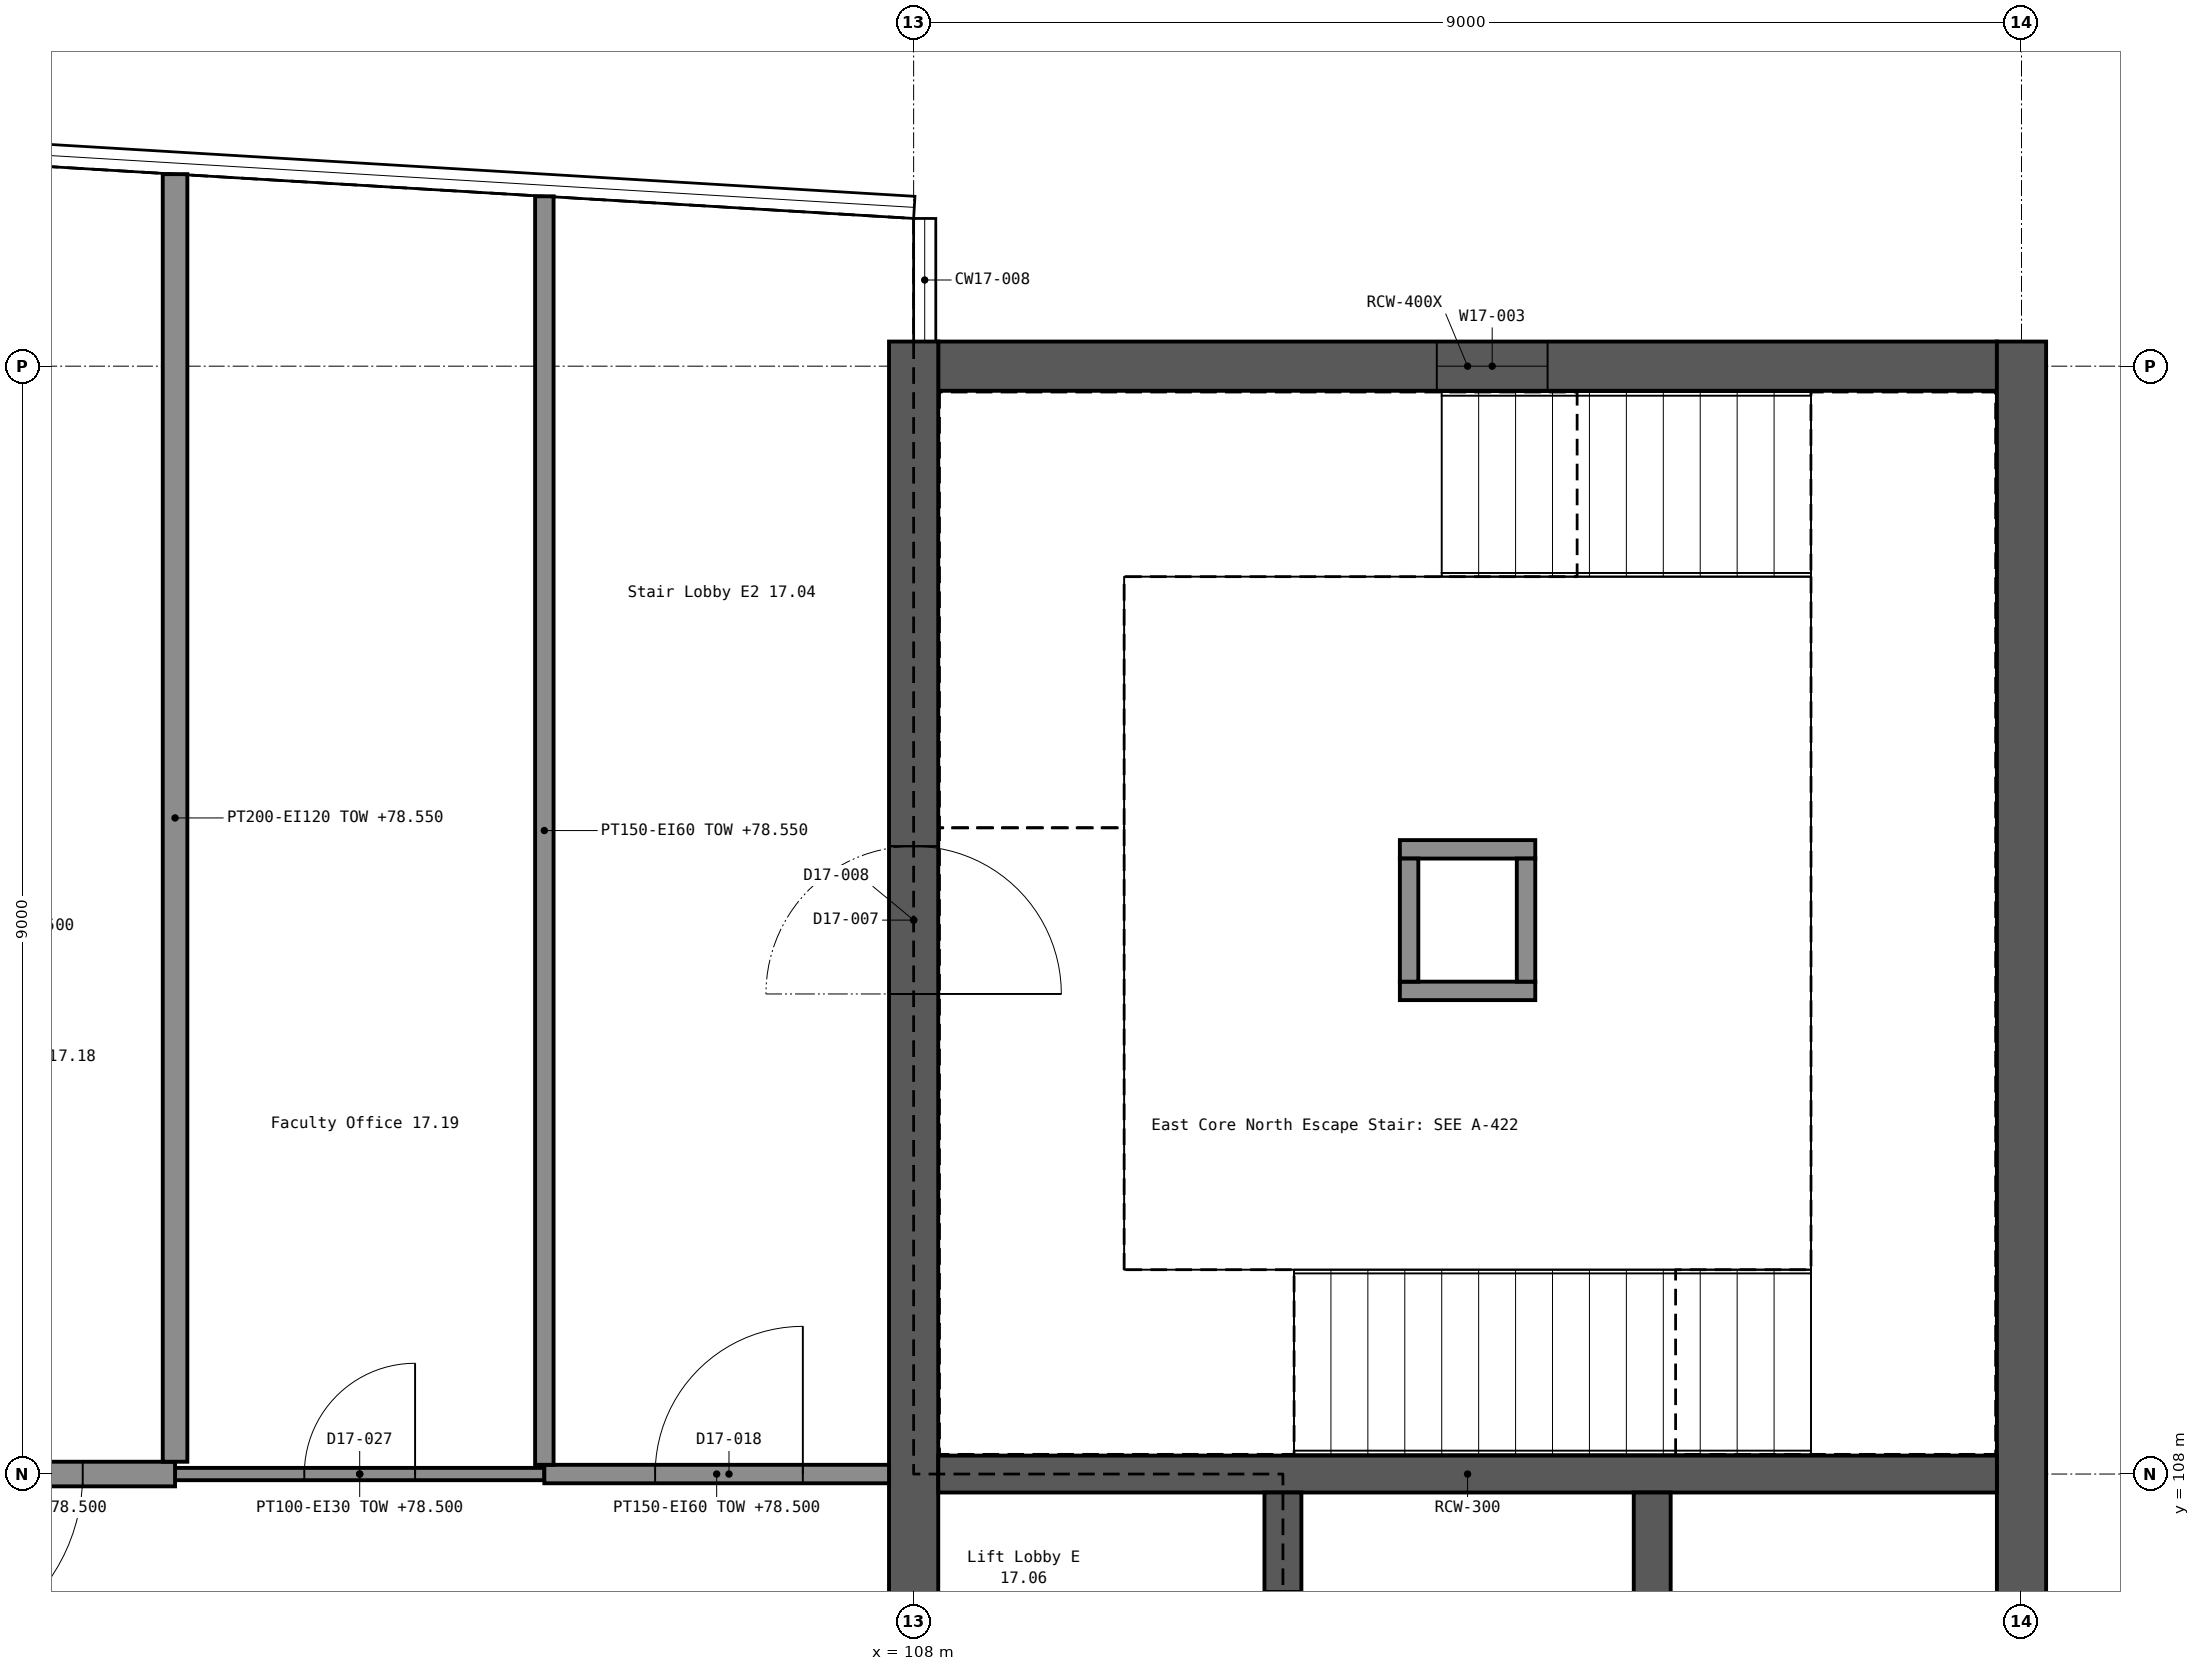
"""IFC4 building model, lengths in metres.
Left out: names, types, materials, properties, quantities, classifications, styles, units other than length and angle.
Written with IfcOpenShell. Run it as: python <this file> out.ifc"""

import sys

from ifc_helpers import new_model, si_unit, direction, frame, frame_2d, origin, origin_2d, place, context, subcontext, project, spatial, rectangle, extrude, element, fill, save


model = new_model("IFC4")
c1 = context("Model", 3, precision=1e-05, world=origin(), true_north=direction((0.0, 1.0)))
c2 = subcontext(c1, "Body", "Model", "MODEL_VIEW")
j1 = project(units=[si_unit("LENGTHUNIT", "METRE"), si_unit("PLANEANGLEUNIT", "RADIAN")], contexts=[c1])
p1 = place(None, origin())
s1 = spatial("IfcSite", under=j1, at=p1, CompositionType="ELEMENT")
p2 = place(p1, origin())
s2 = spatial("IfcBuilding", under=s1, at=p2, CompositionType="ELEMENT")
p3 = place(p2, frame((0.0, 0.0, 75.3)))
s3 = spatial("IfcBuildingStorey", under=s2, at=p3, CompositionType="ELEMENT", Elevation=75.3)
p4 = place(p3, frame((108.2, 117.0, 0.0), z_axis=(0.0, 0.0, 1.0), x_axis=(1.0, 0.0, 0.0)))
e1 = element("IfcWall", 1, at=p4, inside=s3, PredefinedType="SHEAR", context=c2, shape_type="SweptSolid", body=[
    extrude(rectangle(XDim=8.6, YDim=0.4, at=frame_2d((4.3, 0.0))), origin(), (0.0, 0.0, 1.0), 7.5),
])
p5 = place(p4, frame((4.05, 0.0, 1.2)))
e2 = element("IfcOpeningElement", 2, at=p5, cuts=e1, PredefinedType="OPENING", context=c2, shape_type="SweptSolid", body=[
    extrude(rectangle(XDim=0.9, YDim=1.5, at=frame_2d((0.45, 0.75))), frame((0.0, 0.211, 0.0), z_axis=(0.0, -1.0, 0.0), x_axis=(1.0, 0.0, 0.0)), (0.0, 0.0, 1.0), 0.422),
])
p6 = place(p3, frame((108.0, 89.8, 0.0), z_axis=(0.0, 0.0, 1.0), x_axis=(0.0, 1.0, 0.0)))
e3 = element("IfcWall", 3, at=p6, inside=s3, PredefinedType="SHEAR", context=c2, shape_type="SweptSolid", body=[
    extrude(rectangle(XDim=27.4, YDim=0.4, at=frame_2d((13.7, 0.0))), origin(), (0.0, 0.0, 1.0), 7.5),
])
p7 = place(p6, frame((4.1, 0.0, 0.0)))
e4 = element("IfcOpeningElement", 4, at=p7, cuts=e3, PredefinedType="OPENING", context=c2, shape_type="SweptSolid", body=[
    extrude(rectangle(XDim=1.2, YDim=2.1, at=frame_2d((0.6, 1.05))), frame((0.0, 0.211, 0.0), z_axis=(0.0, -1.0, 0.0), x_axis=(1.0, 0.0, 0.0)), (0.0, 0.0, 1.0), 0.422),
])
p8 = place(p6, frame((4.1, 0.0, 3.9)))
e5 = element("IfcOpeningElement", 5, at=p8, cuts=e3, PredefinedType="OPENING", context=c2, shape_type="SweptSolid", body=[
    extrude(rectangle(XDim=1.2, YDim=2.1, at=frame_2d((0.6, 1.05))), frame((0.0, 0.211, 0.0), z_axis=(0.0, -1.0, 0.0), x_axis=(1.0, 0.0, 0.0)), (0.0, 0.0, 1.0), 0.422),
])
p9 = place(p6, frame((22.1, 0.0, 0.0)))
e6 = element("IfcOpeningElement", 6, at=p9, cuts=e3, PredefinedType="OPENING", context=c2, shape_type="SweptSolid", body=[
    extrude(rectangle(XDim=1.2, YDim=2.1, at=frame_2d((0.6, 1.05))), frame((0.0, 0.211, 0.0), z_axis=(0.0, -1.0, 0.0), x_axis=(1.0, 0.0, 0.0)), (0.0, 0.0, 1.0), 0.422),
])
p10 = place(p6, frame((22.1, 0.0, 3.9)))
e7 = element("IfcOpeningElement", 7, at=p10, cuts=e3, PredefinedType="OPENING", context=c2, shape_type="SweptSolid", body=[
    extrude(rectangle(XDim=1.2, YDim=2.1, at=frame_2d((0.6, 1.05))), frame((0.0, 0.211, 0.0), z_axis=(0.0, -1.0, 0.0), x_axis=(1.0, 0.0, 0.0)), (0.0, 0.0, 1.0), 0.422),
])
p11 = place(p6, frame((12.5, 0.0, 0.0)))
e8 = element("IfcOpeningElement", 8, at=p11, cuts=e3, PredefinedType="OPENING", context=c2, shape_type="SweptSolid", body=[
    extrude(rectangle(XDim=2.0, YDim=2.1, at=frame_2d((1.0, 1.05))), frame((0.0, 0.211, 0.0), z_axis=(0.0, -1.0, 0.0), x_axis=(1.0, 0.0, 0.0)), (0.0, 0.0, 1.0), 0.422),
])
p12 = place(p3, frame((117.0, 89.8, 0.0), z_axis=(0.0, 0.0, 1.0), x_axis=(0.0, 1.0, 0.0)))
e9 = element("IfcWall", 9, at=p12, inside=s3, PredefinedType="SHEAR", context=c2, shape_type="SweptSolid", body=[
    extrude(rectangle(XDim=27.4, YDim=0.4, at=frame_2d((13.7, 0.0))), origin(), (0.0, 0.0, 1.0), 7.5),
])
p13 = place(p3, frame((108.2, 108.0, 0.0), z_axis=(0.0, 0.0, 1.0), x_axis=(1.0, 0.0, 0.0)))
e10 = element("IfcWall", 10, at=p13, inside=s3, PredefinedType="SHEAR", context=c2, shape_type="SweptSolid", body=[
    extrude(rectangle(XDim=8.6, YDim=0.3, at=frame_2d((4.3, 0.0))), origin(), (0.0, 0.0, 1.0), 7.5),
])
p14 = place(p3, frame((111.0, 99.15, 0.0), z_axis=(0.0, 0.0, 1.0), x_axis=(0.0, 1.0, 0.0)))
e11 = element("IfcWall", 11, at=p14, inside=s3, PredefinedType="SHEAR", context=c2, shape_type="SweptSolid", body=[
    extrude(rectangle(XDim=8.7, YDim=0.3, at=frame_2d((4.35, 0.0))), origin(), (0.0, 0.0, 1.0), 7.5),
])
p15 = place(p14, frame((0.8, 0.0, 0.0)))
e12 = element("IfcOpeningElement", 12, at=p15, cuts=e11, PredefinedType="OPENING", context=c2, shape_type="SweptSolid", body=[
    extrude(rectangle(XDim=1.1, YDim=2.1, at=frame_2d((0.55, 1.05))), frame((0.0, 0.161, 0.0), z_axis=(0.0, -1.0, 0.0), x_axis=(1.0, 0.0, 0.0)), (0.0, 0.0, 1.0), 0.322),
])
p16 = place(p14, frame((3.8, 0.0, 0.0)))
e13 = element("IfcOpeningElement", 13, at=p16, cuts=e11, PredefinedType="OPENING", context=c2, shape_type="SweptSolid", body=[
    extrude(rectangle(XDim=1.1, YDim=2.1, at=frame_2d((0.55, 1.05))), frame((0.0, 0.161, 0.0), z_axis=(0.0, -1.0, 0.0), x_axis=(1.0, 0.0, 0.0)), (0.0, 0.0, 1.0), 0.322),
])
p17 = place(p14, frame((6.8, 0.0, 0.0)))
e14 = element("IfcOpeningElement", 14, at=p17, cuts=e11, PredefinedType="OPENING", context=c2, shape_type="SweptSolid", body=[
    extrude(rectangle(XDim=1.1, YDim=2.1, at=frame_2d((0.55, 1.05))), frame((0.0, 0.161, 0.0), z_axis=(0.0, -1.0, 0.0), x_axis=(1.0, 0.0, 0.0)), (0.0, 0.0, 1.0), 0.322),
])
p18 = place(p3, frame((114.0, 99.15, 0.0), z_axis=(0.0, 0.0, 1.0), x_axis=(0.0, 1.0, 0.0)))
e15 = element("IfcWall", 15, at=p18, inside=s3, PredefinedType="SHEAR", context=c2, shape_type="SweptSolid", body=[
    extrude(rectangle(XDim=8.7, YDim=0.3, at=frame_2d((4.35, 0.0))), origin(), (0.0, 0.0, 1.0), 7.5),
])
p19 = place(p3, frame((107.875, 117.2, 3.9), z_axis=(0.0, 0.0, 1.0), x_axis=(0.0, 1.0, 0.0)))
e16 = element("IfcWall", 16, at=p19, inside=s3, PredefinedType="PARAPET", context=c2, shape_type="SweptSolid", body=[
    extrude(rectangle(XDim=1.015, YDim=0.25, at=frame_2d((0.507, 0.0))), origin(), (0.0, 0.0, 1.0), 1.1),
])
p20 = place(p3, frame((107.75, 118.09, 3.9), z_axis=(0.0, 0.0, 1.0), x_axis=(-0.998206819367, 0.059859383295, 0.0)))
e17 = element("IfcWall", 17, at=p20, inside=s3, PredefinedType="PARAPET", context=c2, shape_type="SweptSolid", body=[
    extrude(rectangle(XDim=2.957, YDim=0.25, at=frame_2d((1.479, 0.0))), origin(), (0.0, 0.0, 1.0), 2.1),
])
p21 = place(p3, frame((104.799, 118.267, 3.9), z_axis=(0.0, 0.0, 1.0), x_axis=(-0.99820652349, 0.059864317109, 0.0)))
e18 = element("IfcWall", 18, at=p21, inside=s3, PredefinedType="PARAPET", context=c2, shape_type="SweptSolid", body=[
    extrude(rectangle(XDim=2.957, YDim=0.25, at=frame_2d((1.479, 0.0))), origin(), (0.0, 0.0, 1.0), 1.6),
])
p22 = place(p3, frame((101.847, 118.444, 3.9), z_axis=(0.0, 0.0, 1.0), x_axis=(-0.998201882594, 0.059941651511, 0.0)))
e19 = element("IfcWall", 19, at=p22, inside=s3, PredefinedType="PARAPET", context=c2, shape_type="SweptSolid", body=[
    extrude(rectangle(XDim=2.957, YDim=0.25, at=frame_2d((1.479, 0.0))), origin(), (0.0, 0.0, 1.0), 1.3),
])
p23 = place(p3, frame((108.0, 100.1, 7.5), z_axis=(0.0, 0.0, 1.0), x_axis=(0.0, 1.0, 0.0)))
e20 = element("IfcWall", 20, at=p23, inside=s3, PredefinedType="PARAPET", context=c2, shape_type="SweptSolid", body=[
    extrude(rectangle(XDim=17.05, YDim=0.3, at=frame_2d((8.525, 0.0))), origin(), (0.0, 0.0, 1.0), 1.1),
])
p24 = place(p3, frame((117.0, 89.85, 7.5), z_axis=(0.0, 0.0, 1.0), x_axis=(0.0, 1.0, 0.0)))
e21 = element("IfcWall", 21, at=p24, inside=s3, PredefinedType="PARAPET", context=c2, shape_type="SweptSolid", body=[
    extrude(rectangle(XDim=27.3, YDim=0.3, at=frame_2d((13.65, 0.0))), origin(), (0.0, 0.0, 1.0), 1.1),
])
p25 = place(p3, frame((108.15, 117.0, 7.5), z_axis=(0.0, 0.0, 1.0), x_axis=(1.0, 0.0, 0.0)))
e22 = element("IfcWall", 22, at=p25, inside=s3, PredefinedType="PARAPET", context=c2, shape_type="SweptSolid", body=[
    extrude(rectangle(XDim=8.7, YDim=0.3, at=frame_2d((4.35, 0.0))), origin(), (0.0, 0.0, 1.0), 1.1),
])
for number, where, z_axis, x_axis in (
    (23, (111.95, 111.925, 7.5), (0.0, 0.0, 1.0), (1.0, 0.0, 0.0)),
    (24, (111.95, 113.075, 7.5), (0.0, 0.0, 1.0), (1.0, 0.0, 0.0)),
):
    element("IfcWall", number, at=place(p3, frame(where, z_axis=z_axis, x_axis=x_axis)), inside=s3, PredefinedType="SOLIDWALL", context=c2, shape_type="SweptSolid", body=[
        extrude(rectangle(XDim=1.1, YDim=0.15, at=frame_2d((0.55, 0.0))), origin(), (0.0, 0.0, 1.0), 0.15),
    ])
for number, where, z_axis, x_axis in (
    (25, (112.025, 112.0, 7.5), (0.0, 0.0, 1.0), (0.0, 1.0, 0.0)),
    (26, (112.975, 112.0, 7.5), (0.0, 0.0, 1.0), (0.0, 1.0, 0.0)),
):
    element("IfcWall", number, at=place(p3, frame(where, z_axis=z_axis, x_axis=x_axis)), inside=s3, PredefinedType="SOLIDWALL", context=c2, shape_type="SweptSolid", body=[
        extrude(rectangle(XDim=1.0, YDim=0.15, at=frame_2d((0.5, 0.0))), origin(), (0.0, 0.0, 1.0), 0.15),
    ])
p26 = place(p3, frame((102.0, 108.0, 0.0), z_axis=(0.0, 0.0, 1.0), x_axis=(1.0, 0.0, 0.0)))
e27 = element("IfcWall", 27, at=p26, inside=s3, PredefinedType="PARTITIONING", context=c2, shape_type="SweptSolid", body=[
    extrude(rectangle(XDim=3.0, YDim=0.1, at=frame_2d((1.5, 0.0))), origin(), (0.0, 0.0, 1.0), 3.2),
])
p27 = place(p26, frame((1.05, 0.0, 0.0)))
e28 = element("IfcOpeningElement", 28, at=p27, cuts=e27, PredefinedType="OPENING", context=c2, shape_type="SweptSolid", body=[
    extrude(rectangle(XDim=0.9, YDim=2.1, at=frame_2d((0.45, 1.05))), frame((0.0, 0.061, 0.0), z_axis=(0.0, -1.0, 0.0), x_axis=(1.0, 0.0, 0.0)), (0.0, 0.0, 1.0), 0.122),
])
p28 = place(p3, frame((105.0, 108.0, 0.0), z_axis=(0.0, 0.0, 1.0), x_axis=(1.0, 0.0, 0.0)))
e29 = element("IfcWall", 29, at=p28, inside=s3, PredefinedType="PARTITIONING", context=c2, shape_type="SweptSolid", body=[
    extrude(rectangle(XDim=2.8, YDim=0.15, at=frame_2d((1.4, 0.0))), origin(), (0.0, 0.0, 1.0), 3.2),
])
p29 = place(p28, frame((0.9, 0.0, 0.0)))
e30 = element("IfcOpeningElement", 30, at=p29, cuts=e29, PredefinedType="OPENING", context=c2, shape_type="SweptSolid", body=[
    extrude(rectangle(XDim=1.2, YDim=2.1, at=frame_2d((0.6, 1.05))), frame((0.0, 0.086, 0.0), z_axis=(0.0, -1.0, 0.0), x_axis=(1.0, 0.0, 0.0)), (0.0, 0.0, 1.0), 0.172),
])
p30 = place(p3, frame((99.13, 108.0, 0.0), z_axis=(0.0, 0.0, 1.0), x_axis=(1.0, 0.0, 0.0)))
e31 = element("IfcWall", 31, at=p30, inside=s3, PredefinedType="PARTITIONING", context=c2, shape_type="SweptSolid", body=[
    extrude(rectangle(XDim=2.87, YDim=0.2, at=frame_2d((1.435, 0.0))), origin(), (0.0, 0.0, 1.0), 3.2),
])
p31 = place(p30, frame((0.62, 0.0, 0.0)))
e32 = element("IfcOpeningElement", 32, at=p31, cuts=e31, PredefinedType="OPENING", context=c2, shape_type="SweptSolid", body=[
    extrude(rectangle(XDim=1.5, YDim=2.4, at=frame_2d((0.75, 1.2))), frame((0.0, 0.111, 0.0), z_axis=(0.0, -1.0, 0.0), x_axis=(1.0, 0.0, 0.0)), (0.0, 0.0, 1.0), 0.222),
])
p32 = place(p3, frame((102.0, 108.1, 0.0), z_axis=(0.0, 0.0, 1.0), x_axis=(0.0, 1.0, 0.0)))
e33 = element("IfcWall", 33, at=p32, inside=s3, PredefinedType="PARTITIONING", context=c2, shape_type="SweptSolid", body=[
    extrude(rectangle(XDim=10.46, YDim=0.2, at=frame_2d((5.23, 0.0))), origin(), (0.0, 0.0, 1.0), 3.25),
])
p33 = place(p3, frame((105.0, 108.075, 0.0), z_axis=(0.0, 0.0, 1.0), x_axis=(0.0, 1.0, 0.0)))
e34 = element("IfcWall", 34, at=p33, inside=s3, PredefinedType="PARTITIONING", context=c2, shape_type="SweptSolid", body=[
    extrude(rectangle(XDim=10.305, YDim=0.15, at=frame_2d((5.152, 0.0))), origin(), (0.0, 0.0, 1.0), 3.25),
])
p34 = place(p5, origin())
e35 = element("IfcWindow", 35, at=p34, inside=s3, PartitioningType="SINGLE_PANEL", PredefinedType="WINDOW", context=c2, shape_type="SweptSolid", body=[
    extrude(rectangle(XDim=0.9, YDim=1.5, at=frame_2d((0.45, 0.75))), frame((0.0, 0.03, 0.0), z_axis=(0.0, -1.0, 0.0), x_axis=(1.0, 0.0, 0.0)), (0.0, 0.0, 1.0), 0.06),
])
fill(e2, e35)
p35 = place(p2, frame((0.0, 0.0, 82.5)))
p36 = place(p35, origin())
p37 = place(p36, frame((112.5, 112.5, 0.0)))
p38 = place(p37, frame((0.0, 0.0, 0.25)))
e36 = element("IfcWindow", 36, at=p38, inside=s3, PartitioningType="SINGLE_PANEL", PredefinedType="SKYLIGHT", context=c2, shape_type="SweptSolid", body=[
    extrude(rectangle(XDim=0.8, YDim=1.0, at=origin_2d()), origin(), (0.0, 0.0, 1.0), 0.05),
])
p39 = place(p9, frame((1.2, 0.0, 0.0), z_axis=(0.0, 0.0, 1.0), x_axis=(-1.0, 0.0, 0.0)))
e37 = element("IfcDoor", 37, at=p39, inside=s3, OperationType="SINGLE_SWING_RIGHT", PredefinedType="DOOR", context=c2, shape_type="SweptSolid", body=[
    extrude(rectangle(XDim=1.2, YDim=2.1, at=frame_2d((0.6, 1.05))), frame((0.0, 0.025, 0.0), z_axis=(0.0, -1.0, 0.0), x_axis=(1.0, 0.0, 0.0)), (0.0, 0.0, 1.0), 0.05),
])
fill(e6, e37)
p40 = place(p10, origin())
e38 = element("IfcDoor", 38, at=p40, inside=s3, OperationType="SINGLE_SWING_LEFT", PredefinedType="DOOR", context=c2, shape_type="SweptSolid", body=[
    extrude(rectangle(XDim=1.2, YDim=2.1, at=frame_2d((0.6, 1.05))), frame((0.0, 0.025, 0.0), z_axis=(0.0, -1.0, 0.0), x_axis=(1.0, 0.0, 0.0)), (0.0, 0.0, 1.0), 0.05),
])
fill(e7, e38)
p41 = place(p29, origin())
e39 = element("IfcDoor", 39, at=p41, inside=s3, OperationType="SINGLE_SWING_RIGHT", PredefinedType="DOOR", context=c2, shape_type="SweptSolid", body=[
    extrude(rectangle(XDim=1.2, YDim=2.1, at=frame_2d((0.6, 1.05))), frame((0.0, 0.025, 0.0), z_axis=(0.0, -1.0, 0.0), x_axis=(1.0, 0.0, 0.0)), (0.0, 0.0, 1.0), 0.05),
])
fill(e30, e39)
p42 = place(p31, frame((1.5, 0.0, 0.0), z_axis=(0.0, 0.0, 1.0), x_axis=(-1.0, 0.0, 0.0)))
e40 = element("IfcDoor", 40, at=p42, inside=s3, OperationType="DOUBLE_DOOR_SINGLE_SWING", PredefinedType="DOOR", context=c2, shape_type="SweptSolid", body=[
    extrude(rectangle(XDim=1.5, YDim=2.4, at=frame_2d((0.75, 1.2))), frame((0.0, 0.025, 0.0), z_axis=(0.0, -1.0, 0.0), x_axis=(1.0, 0.0, 0.0)), (0.0, 0.0, 1.0), 0.05),
])
fill(e32, e40)
p43 = place(p27, origin())
e41 = element("IfcDoor", 41, at=p43, inside=s3, OperationType="SINGLE_SWING_RIGHT", PredefinedType="DOOR", context=c2, shape_type="SweptSolid", body=[
    extrude(rectangle(XDim=0.9, YDim=2.1, at=frame_2d((0.45, 1.05))), frame((0.0, 0.025, 0.0), z_axis=(0.0, -1.0, 0.0), x_axis=(1.0, 0.0, 0.0)), (0.0, 0.0, 1.0), 0.05),
])
fill(e28, e41)
save(model, sys.argv[1])
